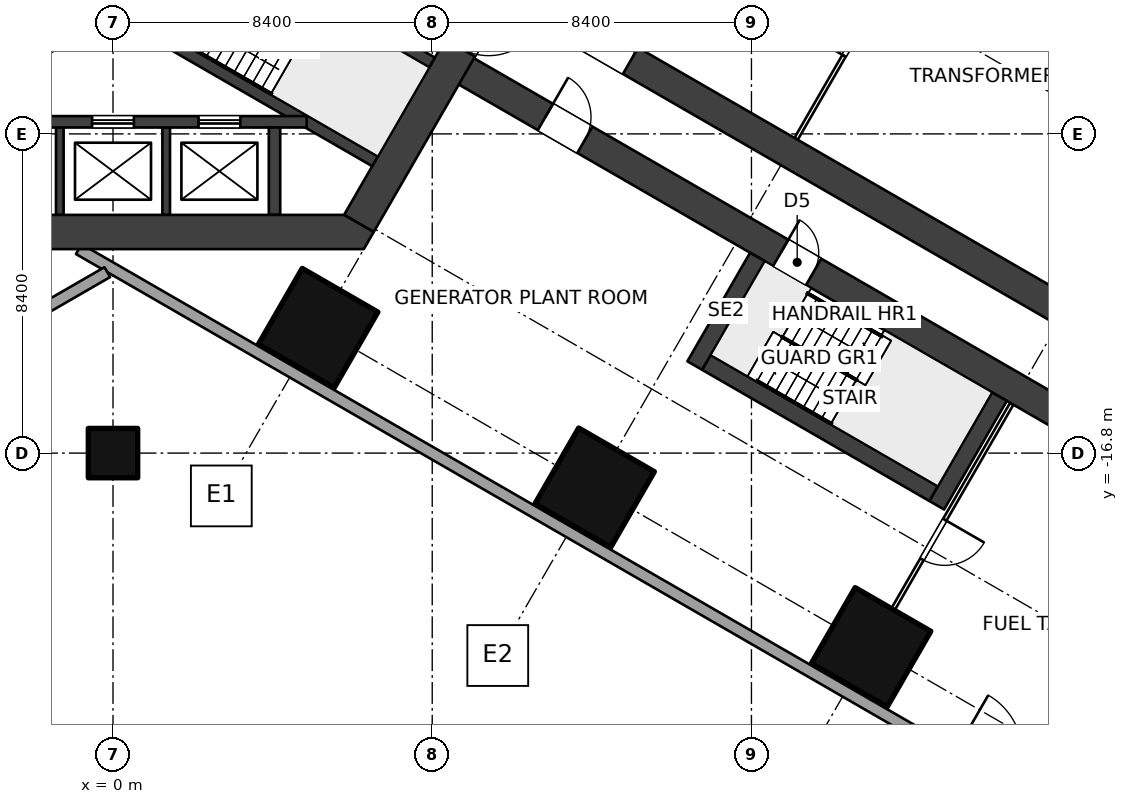
"""IFC4 building model, lengths in metres.
Left out: names, types, materials, properties, quantities, classifications, styles, units other than length and angle.
Written with IfcOpenShell. Run it as: python <this file> out.ifc"""

import sys

from ifc_helpers import new_model, si_unit, direction, frame, frame_2d, origin, origin_2d, place, context, subcontext, project, spatial, polyline, rectangle, outline, extrude, element, fill, save


model = new_model("IFC4")
c1 = context("Model", 3, precision=1e-05, world=origin(), true_north=direction((0.0, 1.0)))
c2 = subcontext(c1, "Body", "Model", "MODEL_VIEW")
j1 = project(units=[si_unit("LENGTHUNIT", "METRE"), si_unit("PLANEANGLEUNIT", "RADIAN")], contexts=[c1])
p1 = place(None, origin())
s1 = spatial("IfcSite", under=j1, at=p1, CompositionType="ELEMENT")
p2 = place(p1, origin())
s2 = spatial("IfcBuilding", under=s1, at=p2, CompositionType="ELEMENT")
p3 = place(p2, origin())
s3 = spatial("IfcBuildingStorey", under=s2, at=p3, CompositionType="ELEMENT", Elevation=0.0)
for number, where, z_axis, x_axis in (
    (1, (5.4, -13.51, 0.0), (0.0, 0.0, 1.0), (-0.5, -0.866, 0.0)),
    (2, (12.675, -17.71, 0.0), (0.0, 0.0, 1.0), (-0.5, -0.866, 0.0)),
    (3, (19.949, -21.91, 0.0), (0.0, 0.0, 1.0), (-0.5, -0.866, 0.0)),
):
    element("IfcColumn", number, at=place(p3, frame(where, z_axis=z_axis, x_axis=x_axis)), inside=s3, PredefinedType="COLUMN", context=c2, shape_type="SweptSolid", body=[
        extrude(rectangle(XDim=2.3, YDim=2.3, at=origin_2d()), origin(), (0.0, 0.0, 1.0), 6.0),
    ])
p4 = place(p3, frame((0.0, -16.8, 0.0), z_axis=(0.0, 0.0, 1.0), x_axis=(1.0, 0.0, 0.0)))
e4 = element("IfcColumn", 4, at=p4, inside=s3, PredefinedType="COLUMN", context=c2, shape_type="SweptSolid", body=[
    extrude(rectangle(XDim=1.3, YDim=1.3, at=origin_2d()), origin(), (0.0, 0.0, 1.0), 6.0),
])
p5 = place(p3, frame((12.551, -0.225, 0.0), z_axis=(0.0, 0.0, 1.0), x_axis=(-0.499997612506, -0.8660267822, 0.0)))
e5 = element("IfcWall", 5, at=p5, inside=s3, PredefinedType="SHEAR", context=c2, shape_type="SweptSolid", body=[
    extrude(rectangle(XDim=12.161, YDim=0.9, at=frame_2d((6.08, 0.0))), origin(), (0.0, 0.0, 1.0), 6.0),
])
p6 = place(p5, frame((5.33, 0.0, 0.0)))
e6 = element("IfcOpeningElement", 6, at=p6, cuts=e5, PredefinedType="OPENING", context=c2, shape_type="SweptSolid", body=[
    extrude(rectangle(XDim=1.5, YDim=2.1, at=frame_2d((0.75, 1.05))), frame((0.0, 0.46, 0.0), z_axis=(0.0, -1.0, 0.0), x_axis=(1.0, 0.0, 0.0)), (0.0, 0.0, 1.0), 0.92),
])
p7 = place(p3, origin())
e7 = element("IfcWall", 7, at=p7, inside=s3, PredefinedType="SHEAR", context=c2, shape_type="SweptSolid", body=[
    extrude(outline(polyline([(-6.6, -11.432), (6.6, -11.432), (6.86, -10.981), (6.08, -10.531), (-6.08, -10.531), (-6.86, -10.981), (-6.6, -11.432)])), origin(), (0.0, 0.0, 1.0), 6.0),
])
p8 = place(p3, frame((-0.919, -5.669, 0.0), z_axis=(0.0, 0.0, 1.0), x_axis=(-0.866011800373, -0.500023561059, 0.0)))
e8 = element("IfcWall", 8, at=p8, inside=s3, PredefinedType="SHEAR", context=c2, shape_type="SweptSolid", body=[
    extrude(rectangle(XDim=6.902, YDim=0.3, at=frame_2d((3.451, 0.0))), origin(), (0.0, 0.0, 1.0), 6.0),
])
p9 = place(p3, frame((2.419, -3.071, 0.0), z_axis=(0.0, 0.0, 1.0), x_axis=(0.86602711848, -0.499997030048, 0.0)))
e9 = element("IfcWall", 9, at=p9, inside=s3, PredefinedType="SHEAR", context=c2, shape_type="SweptSolid", body=[
    extrude(rectangle(XDim=6.901, YDim=0.3, at=frame_2d((3.451, 0.0))), origin(), (0.0, 0.0, 1.0), 6.0),
])
p10 = place(p9, frame((0.25, 0.0, 0.0)))
e10 = element("IfcOpeningElement", 10, at=p10, cuts=e9, PredefinedType="OPENING", context=c2, shape_type="SweptSolid", body=[
    extrude(rectangle(XDim=1.0, YDim=2.1, at=frame_2d((0.5, 1.05))), frame((0.0, 0.16, 0.0), z_axis=(0.0, -1.0, 0.0), x_axis=(1.0, 0.0, 0.0)), (0.0, 0.0, 1.0), 0.32),
])
p11 = place(p3, frame((0.919, -5.669, 0.0), z_axis=(0.0, 0.0, 1.0), x_axis=(0.866011800373, -0.500023561059, 0.0)))
e11 = element("IfcWall", 11, at=p11, inside=s3, PredefinedType="SHEAR", context=c2, shape_type="SweptSolid", body=[
    extrude(rectangle(XDim=6.902, YDim=0.3, at=frame_2d((3.451, 0.0))), origin(), (0.0, 0.0, 1.0), 6.0),
])
p12 = place(p3, frame((5.098, -8.082, 0.0), z_axis=(0.0, 0.0, 1.0), x_axis=(-1.0, 0.0, 0.0)))
e12 = element("IfcWall", 12, at=p12, inside=s3, PredefinedType="SHEAR", context=c2, shape_type="SweptSolid", body=[
    extrude(rectangle(XDim=10.195, YDim=0.3, at=frame_2d((5.098, 0.0))), origin(), (0.0, 0.0, 1.0), 6.0),
])
p13 = place(p12, frame((1.748, 0.0, 0.0)))
e13 = element("IfcOpeningElement", 13, at=p13, cuts=e12, PredefinedType="OPENING", context=c2, shape_type="SweptSolid", body=[
    extrude(rectangle(XDim=1.1, YDim=2.1, at=frame_2d((0.55, 1.05))), frame((0.0, 0.16, 0.0), z_axis=(0.0, -1.0, 0.0), x_axis=(1.0, 0.0, 0.0)), (0.0, 0.0, 1.0), 0.32),
])
p14 = place(p12, frame((4.548, 0.0, 0.0)))
e14 = element("IfcOpeningElement", 14, at=p14, cuts=e12, PredefinedType="OPENING", context=c2, shape_type="SweptSolid", body=[
    extrude(rectangle(XDim=1.1, YDim=2.1, at=frame_2d((0.55, 1.05))), frame((0.0, 0.16, 0.0), z_axis=(0.0, -1.0, 0.0), x_axis=(1.0, 0.0, 0.0)), (0.0, 0.0, 1.0), 0.32),
])
p15 = place(p12, frame((7.348, 0.0, 0.0)))
e15 = element("IfcOpeningElement", 15, at=p15, cuts=e12, PredefinedType="OPENING", context=c2, shape_type="SweptSolid", body=[
    extrude(rectangle(XDim=1.1, YDim=2.1, at=frame_2d((0.55, 1.05))), frame((0.0, 0.16, 0.0), z_axis=(0.0, -1.0, 0.0), x_axis=(1.0, 0.0, 0.0)), (0.0, 0.0, 1.0), 0.32),
])
p16 = place(p3, frame((4.25, -8.231, 0.0), z_axis=(0.0, 0.0, 1.0), x_axis=(0.0, -1.0, 0.0)))
e16 = element("IfcWall", 16, at=p16, inside=s3, PredefinedType="SHEAR", context=c2, shape_type="SweptSolid", body=[
    extrude(rectangle(XDim=2.3, YDim=0.3, at=frame_2d((1.15, 0.0))), origin(), (0.0, 0.0, 1.0), 6.0),
])
for number, where, z_axis, x_axis in (
    (17, (1.4, -8.231, 0.0), (0.0, 0.0, 1.0), (0.0, -1.0, 0.0)),
    (18, (-1.4, -8.231, 0.0), (0.0, 0.0, 1.0), (0.0, -1.0, 0.0)),
):
    element("IfcWall", number, at=place(p3, frame(where, z_axis=z_axis, x_axis=x_axis)), inside=s3, PredefinedType="SHEAR", context=c2, shape_type="SweptSolid", body=[
        extrude(rectangle(XDim=2.3, YDim=0.2, at=frame_2d((1.15, 0.0))), origin(), (0.0, 0.0, 1.0), 6.0),
    ])
p17 = place(p3, frame((10.11, -4.451, 0.0), z_axis=(0.0, 0.0, 1.0), x_axis=(0.866025284237, -0.500000207062, 0.0)))
e19 = element("IfcWall", 19, at=p17, inside=s3, PredefinedType="SHEAR", context=c2, shape_type="SweptSolid", body=[
    extrude(rectangle(XDim=36.75, YDim=0.8, at=frame_2d((18.375, 0.0))), origin(), (0.0, 0.0, 1.0), 6.0),
])
p18 = place(p17, frame((2.85, 0.0, 0.0)))
e20 = element("IfcOpeningElement", 20, at=p18, cuts=e19, PredefinedType="OPENING", context=c2, shape_type="SweptSolid", body=[
    extrude(rectangle(XDim=1.2, YDim=2.1, at=frame_2d((0.6, 1.05))), frame((0.0, 0.41, 0.0), z_axis=(0.0, -1.0, 0.0), x_axis=(1.0, 0.0, 0.0)), (0.0, 0.0, 1.0), 0.82),
])
p19 = place(p3, frame((8.91, -6.53, 0.0), z_axis=(0.0, 0.0, 1.0), x_axis=(0.866025284237, -0.500000207062, 0.0)))
e21 = element("IfcWall", 21, at=p19, inside=s3, PredefinedType="SHEAR", context=c2, shape_type="SweptSolid", body=[
    extrude(rectangle(XDim=36.75, YDim=0.8, at=frame_2d((18.375, 0.0))), origin(), (0.0, 0.0, 1.0), 6.0),
])
p20 = place(p19, frame((10.0, 0.0, 0.0)))
e22 = element("IfcOpeningElement", 22, at=p20, cuts=e21, PredefinedType="OPENING", context=c2, shape_type="SweptSolid", body=[
    extrude(rectangle(XDim=1.0, YDim=2.1, at=frame_2d((0.5, 1.05))), frame((0.0, 0.41, 0.0), z_axis=(0.0, -1.0, 0.0), x_axis=(1.0, 0.0, 0.0)), (0.0, 0.0, 1.0), 0.82),
])
p21 = place(p19, frame((2.85, 0.0, 0.0)))
e23 = element("IfcOpeningElement", 23, at=p21, cuts=e21, PredefinedType="OPENING", context=c2, shape_type="SweptSolid", body=[
    extrude(rectangle(XDim=1.2, YDim=2.1, at=frame_2d((0.6, 1.05))), frame((0.0, 0.41, 0.0), z_axis=(0.0, -1.0, 0.0), x_axis=(1.0, 0.0, 0.0)), (0.0, 0.0, 1.0), 0.82),
])
p22 = place(p3, frame((17.975, -8.53, 0.0), z_axis=(0.0, 0.0, 1.0), x_axis=(0.500004234368, 0.866022959057, 0.0)))
e24 = element("IfcWall", 24, at=p22, inside=s3, PredefinedType="PARTITIONING", context=c2, shape_type="SweptSolid", body=[
    extrude(rectangle(XDim=6.25, YDim=0.1, at=frame_2d((3.125, 0.0))), origin(), (0.0, 0.0, 1.0), 3.9),
])
p23 = place(p22, frame((2.525, 0.0, 0.0)))
e25 = element("IfcOpeningElement", 25, at=p23, cuts=e24, PredefinedType="OPENING", context=c2, shape_type="SweptSolid", body=[
    extrude(rectangle(XDim=1.2, YDim=2.1, at=frame_2d((0.6, 1.05))), frame((0.0, 0.06, 0.0), z_axis=(0.0, -1.0, 0.0), x_axis=(1.0, 0.0, 0.0)), (0.0, 0.0, 1.0), 0.12),
])
p24 = place(p3, frame((23.649, -15.501, 0.0), z_axis=(0.0, 0.0, 1.0), x_axis=(-0.500004234368, -0.866022959057, 0.0)))
e26 = element("IfcWall", 26, at=p24, inside=s3, PredefinedType="PARTITIONING", context=c2, shape_type="SweptSolid", body=[
    extrude(rectangle(XDim=6.25, YDim=0.1, at=frame_2d((3.125, 0.0))), origin(), (0.0, 0.0, 1.0), 3.9),
])
p25 = place(p24, frame((3.525, 0.0, 0.0)))
e27 = element("IfcOpeningElement", 27, at=p25, cuts=e26, PredefinedType="OPENING", context=c2, shape_type="SweptSolid", body=[
    extrude(rectangle(XDim=1.2, YDim=2.1, at=frame_2d((0.6, 1.05))), frame((0.0, 0.06, 0.0), z_axis=(0.0, -1.0, 0.0), x_axis=(1.0, 0.0, 0.0)), (0.0, 0.0, 1.0), 0.12),
])
p26 = place(p3, frame((-0.15, -12.038, 0.0), z_axis=(0.0, 0.0, 1.0), x_axis=(-0.866026292622, -0.499998460486, 0.0)))
e28 = element("IfcWall", 28, at=p26, inside=s3, PredefinedType="SOLIDWALL", context=c2, shape_type="SweptSolid", body=[
    extrude(rectangle(XDim=41.883, YDim=0.3, at=frame_2d((20.941, 0.0))), origin(), (0.0, 0.0, 1.0), 5.7),
])
p27 = place(p26, frame((25.383, 0.0, 0.0)))
e29 = element("IfcOpeningElement", 29, at=p27, cuts=e28, PredefinedType="OPENING", context=c2, shape_type="SweptSolid", body=[
    extrude(rectangle(XDim=1.8, YDim=2.4, at=frame_2d((0.9, 1.2))), frame((0.0, 0.16, 0.0), z_axis=(0.0, -1.0, 0.0), x_axis=(1.0, 0.0, 0.0)), (0.0, 0.0, 1.0), 0.32),
])
p28 = place(p3, frame((9.45, 6.495, 0.0), z_axis=(0.0, 0.0, 1.0), x_axis=(0.866025301493, -0.500000177174, 0.0)))
e30 = element("IfcWall", 30, at=p28, inside=s3, PredefinedType="SOLIDWALL", context=c2, shape_type="SweptSolid", body=[
    extrude(rectangle(XDim=43.095, YDim=0.3, at=frame_2d((21.548, 0.0))), origin(), (0.0, 0.0, 1.0), 5.7),
])
p29 = place(p28, frame((26.595, 0.0, 0.0)))
e31 = element("IfcOpeningElement", 31, at=p29, cuts=e30, PredefinedType="OPENING", context=c2, shape_type="SweptSolid", body=[
    extrude(rectangle(XDim=1.8, YDim=2.4, at=frame_2d((0.9, 1.2))), frame((0.0, 0.16, 0.0), z_axis=(0.0, -1.0, 0.0), x_axis=(1.0, 0.0, 0.0)), (0.0, 0.0, 1.0), 0.32),
])
p30 = place(p3, frame((-0.9, -11.432, 0.0), z_axis=(0.0, 0.0, 1.0), x_axis=(0.866025301493, -0.500000177174, 0.0)))
e32 = element("IfcWall", 32, at=p30, inside=s3, PredefinedType="SOLIDWALL", context=c2, shape_type="SweptSolid", body=[
    extrude(rectangle(XDim=43.095, YDim=0.3, at=frame_2d((21.548, 0.0))), origin(), (0.0, 0.0, 1.0), 5.7),
])
p31 = place(p30, frame((26.595, 0.0, 0.0)))
e33 = element("IfcOpeningElement", 33, at=p31, cuts=e32, PredefinedType="OPENING", context=c2, shape_type="SweptSolid", body=[
    extrude(rectangle(XDim=1.8, YDim=2.4, at=frame_2d((0.9, 1.2))), frame((0.0, 0.16, 0.0), z_axis=(0.0, -1.0, 0.0), x_axis=(1.0, 0.0, 0.0)), (0.0, 0.0, 1.0), 0.32),
])
for number, where, z_axis, x_axis in (
    (34, (16.959, -11.639, 0.0), (0.0, 0.0, 1.0), (-0.5, -0.866, 0.0)),
    (35, (23.324, -15.314, 0.0), (0.0, 0.0, 1.0), (-0.5, -0.866, 0.0)),
):
    element("IfcWall", number, at=place(p3, frame(where, z_axis=z_axis, x_axis=x_axis)), inside=s3, PredefinedType="SOLIDWALL", context=c2, shape_type="SweptSolid", body=[
        extrude(rectangle(XDim=3.3, YDim=0.45, at=frame_2d((1.65, 0.0))), origin(), (0.0, 0.0, 1.0), 6.0),
    ])
p32 = place(p3, frame((15.616, -14.415, 0.0), z_axis=(0.0, 0.0, 1.0), x_axis=(0.866028853923, -0.499994024137, 0.0)))
e36 = element("IfcWall", 36, at=p32, inside=s3, PredefinedType="SOLIDWALL", context=c2, shape_type="SweptSolid", body=[
    extrude(rectangle(XDim=6.9, YDim=0.45, at=frame_2d((3.45, 0.0))), origin(), (0.0, 0.0, 1.0), 6.0),
])
p33 = place(p13, origin())
e37 = element("IfcDoor", 37, at=p33, inside=s3, OperationType="DOUBLE_DOOR_SLIDING", PredefinedType="DOOR", context=c2, shape_type="SweptSolid", body=[
    extrude(rectangle(XDim=1.1, YDim=2.1, at=frame_2d((0.55, 1.05))), frame((0.0, 0.025, 0.0), z_axis=(0.0, -1.0, 0.0), x_axis=(1.0, 0.0, 0.0)), (0.0, 0.0, 1.0), 0.05),
])
fill(e13, e37)
p34 = place(p14, origin())
e38 = element("IfcDoor", 38, at=p34, inside=s3, OperationType="DOUBLE_DOOR_SLIDING", PredefinedType="DOOR", context=c2, shape_type="SweptSolid", body=[
    extrude(rectangle(XDim=1.1, YDim=2.1, at=frame_2d((0.55, 1.05))), frame((0.0, 0.025, 0.0), z_axis=(0.0, -1.0, 0.0), x_axis=(1.0, 0.0, 0.0)), (0.0, 0.0, 1.0), 0.05),
])
fill(e14, e38)
p35 = place(p20, origin())
e39 = element("IfcDoor", 39, at=p35, inside=s3, OperationType="SINGLE_SWING_LEFT", PredefinedType="DOOR", context=c2, shape_type="SweptSolid", body=[
    extrude(rectangle(XDim=1.0, YDim=2.1, at=frame_2d((0.5, 1.05))), frame((0.0, 0.025, 0.0), z_axis=(0.0, -1.0, 0.0), x_axis=(1.0, 0.0, 0.0)), (0.0, 0.0, 1.0), 0.05),
])
fill(e22, e39)
p36 = place(p23, origin())
e40 = element("IfcDoor", 40, at=p36, inside=s3, OperationType="DOUBLE_SWING_LEFT", PredefinedType="DOOR", context=c2, shape_type="SweptSolid", body=[
    extrude(rectangle(XDim=1.2, YDim=2.1, at=frame_2d((0.6, 1.05))), frame((0.0, 0.025, 0.0), z_axis=(0.0, -1.0, 0.0), x_axis=(1.0, 0.0, 0.0)), (0.0, 0.0, 1.0), 0.05),
])
fill(e25, e40)
p37 = place(p18, origin())
e41 = element("IfcDoor", 41, at=p37, inside=s3, OperationType="DOUBLE_SWING_LEFT", PredefinedType="DOOR", context=c2, shape_type="SweptSolid", body=[
    extrude(rectangle(XDim=1.2, YDim=2.1, at=frame_2d((0.6, 1.05))), frame((0.0, 0.025, 0.0), z_axis=(0.0, -1.0, 0.0), x_axis=(1.0, 0.0, 0.0)), (0.0, 0.0, 1.0), 0.05),
])
fill(e20, e41)
p38 = place(p25, origin())
e42 = element("IfcDoor", 42, at=p38, inside=s3, OperationType="DOUBLE_SWING_LEFT", PredefinedType="DOOR", context=c2, shape_type="SweptSolid", body=[
    extrude(rectangle(XDim=1.2, YDim=2.1, at=frame_2d((0.6, 1.05))), frame((0.0, 0.025, 0.0), z_axis=(0.0, -1.0, 0.0), x_axis=(1.0, 0.0, 0.0)), (0.0, 0.0, 1.0), 0.05),
])
fill(e27, e42)
p39 = place(p21, origin())
e43 = element("IfcDoor", 43, at=p39, inside=s3, OperationType="DOUBLE_SWING_LEFT", PredefinedType="DOOR", context=c2, shape_type="SweptSolid", body=[
    extrude(rectangle(XDim=1.2, YDim=2.1, at=frame_2d((0.6, 1.05))), frame((0.0, 0.025, 0.0), z_axis=(0.0, -1.0, 0.0), x_axis=(1.0, 0.0, 0.0)), (0.0, 0.0, 1.0), 0.05),
])
fill(e23, e43)
save(model, sys.argv[1])
